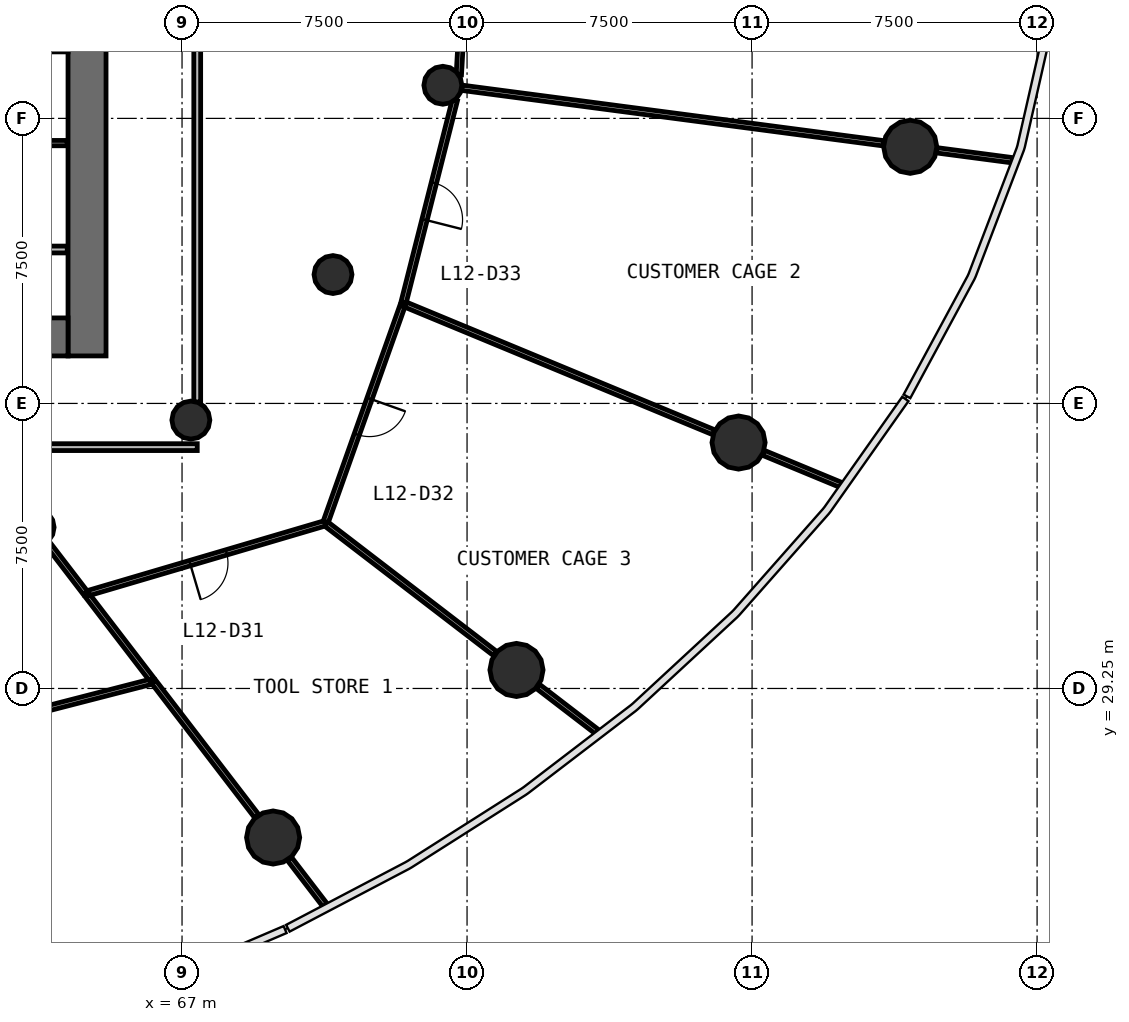
"""IFC4 building model, lengths in metres.
Left out: names, types, materials, properties, quantities, classifications, styles, units other than length and angle.
Written with IfcOpenShell. Run it as: python <this file> out.ifc"""

import sys

from ifc_helpers import new_model, si_unit, direction, frame, frame_2d, origin, origin_2d, place, context, subcontext, project, spatial, rectangle, circle, extrude, source, transform, mapped, element, fill, save


model = new_model("IFC4")
c1 = context("Model", 3, precision=1e-05, world=origin(), true_north=direction((0.0, 1.0)))
c2 = subcontext(c1, "Body", "Model", "MODEL_VIEW")
j1 = project(units=[si_unit("LENGTHUNIT", "METRE"), si_unit("PLANEANGLEUNIT", "RADIAN")], contexts=[c1])
p1 = place(None, origin())
s1 = spatial("IfcSite", under=j1, at=p1, CompositionType="ELEMENT")
p2 = place(p1, origin())
s2 = spatial("IfcBuilding", under=s1, at=p2, CompositionType="ELEMENT")
p3 = place(p2, frame((0.0, 0.0, 53.4)))
s3 = spatial("IfcBuildingStorey", under=s2, at=p3, CompositionType="ELEMENT", Elevation=53.4)
p4 = place(p3, frame((64.5, 38.0, 0.0), z_axis=(0.0, 0.0, 1.0), x_axis=(0.0, 1.0, 0.0)))
e1 = element("IfcWall", 1, at=p4, inside=s3, PredefinedType="SHEAR", context=c2, shape_type="SweptSolid", body=[
    extrude(rectangle(XDim=20.0, YDim=1.0, at=frame_2d((10.0, 0.0))), origin(), (0.0, 0.0, 1.0), 4.4),
])
p5 = place(p4, frame((9.1, 0.0, 0.0)))
e2 = element("IfcOpeningElement", 2, at=p5, cuts=e1, PredefinedType="OPENING", context=c2, shape_type="SweptSolid", body=[
    extrude(rectangle(XDim=1.8, YDim=2.1, at=frame_2d((0.9, 1.05))), frame((0.0, 0.51, 0.0), z_axis=(0.0, -1.0, 0.0), x_axis=(1.0, 0.0, 0.0)), (0.0, 0.0, 1.0), 1.02),
])
p6 = place(p3, frame((40.0, 38.5, 0.0), z_axis=(0.0, 0.0, 1.0), x_axis=(1.0, 0.0, 0.0)))
e3 = element("IfcWall", 3, at=p6, inside=s3, PredefinedType="SHEAR", context=c2, shape_type="SweptSolid", body=[
    extrude(rectangle(XDim=24.0, YDim=1.0, at=frame_2d((12.0, 0.0))), origin(), (0.0, 0.0, 1.0), 4.4),
])
p7 = place(p6, frame((21.45, 0.0, 0.0)))
e4 = element("IfcOpeningElement", 4, at=p7, cuts=e3, PredefinedType="OPENING", context=c2, shape_type="SweptSolid", body=[
    extrude(rectangle(XDim=1.1, YDim=2.1, at=frame_2d((0.55, 1.05))), frame((0.0, 0.51, 0.0), z_axis=(0.0, -1.0, 0.0), x_axis=(1.0, 0.0, 0.0)), (0.0, 0.0, 1.0), 1.02),
])
p8 = place(p6, frame((1.95, 0.0, 0.0)))
e5 = element("IfcOpeningElement", 5, at=p8, cuts=e3, PredefinedType="OPENING", context=c2, shape_type="SweptSolid", body=[
    extrude(rectangle(XDim=1.1, YDim=2.1, at=frame_2d((0.55, 1.05))), frame((0.0, 0.51, 0.0), z_axis=(0.0, -1.0, 0.0), x_axis=(1.0, 0.0, 0.0)), (0.0, 0.0, 1.0), 1.02),
])
m1 = source(origin(), c2, "Body", "SweptSolid", [
    extrude(circle(Radius=0.7, at=origin_2d()), origin(), (0.0, 0.0, 1.0), 4.4),
])
for number, where, z_axis, x_axis in (
    (6, (69.396, 25.328, 0.0), (0.0, 0.0, 1.0), (1.0, 0.0, 0.0)),
    (7, (75.801, 29.737, 0.0), (0.0, 0.0, 1.0), (1.0, 0.0, 0.0)),
    (8, (81.645, 35.721, 0.0), (0.0, 0.0, 1.0), (1.0, 0.0, 0.0)),
    (9, (86.161, 43.503, 0.0), (0.0, 0.0, 1.0), (1.0, 0.0, 0.0)),
):
    element("IfcColumn", number, at=place(p3, frame(where, z_axis=z_axis, x_axis=x_axis)), inside=s3, PredefinedType="COLUMN", context=c2, shape_type="MappedRepresentation", body=[
        mapped(m1, transform((0.0, 0.0, 0.0), scale=1.0)),
    ])
m2 = source(origin(), c2, "Body", "SweptSolid", [
    extrude(circle(Radius=0.5, at=origin_2d()), origin(), (0.0, 0.0, 1.0), 4.4),
])
for number, where, z_axis, x_axis in (
    (10, (63.134, 33.49, 0.0), (0.0, 0.0, 1.0), (1.0, 0.0, 0.0)),
    (11, (67.232, 36.312, 0.0), (0.0, 0.0, 1.0), (1.0, 0.0, 0.0)),
    (12, (70.972, 40.141, 0.0), (0.0, 0.0, 1.0), (1.0, 0.0, 0.0)),
    (13, (73.863, 45.122, 0.0), (0.0, 0.0, 1.0), (1.0, 0.0, 0.0)),
):
    element("IfcColumn", number, at=place(p3, frame(where, z_axis=z_axis, x_axis=x_axis)), inside=s3, PredefinedType="COLUMN", context=c2, shape_type="MappedRepresentation", body=[
        mapped(m2, transform((0.0, 0.0, 0.0), scale=1.0)),
    ])
p9 = place(p3, frame((67.4, 35.6, 0.0), z_axis=(0.0, 0.0, 1.0), x_axis=(-1.0, 0.0, 0.0)))
e14 = element("IfcWall", 14, at=p9, inside=s3, PredefinedType="PARTITIONING", context=c2, shape_type="SweptSolid", body=[
    extrude(rectangle(XDim=30.8, YDim=0.18, at=frame_2d((15.4, 0.0))), origin(), (0.0, 0.0, 1.0), 3.05),
])
p10 = place(p9, frame((27.45, 0.0, 0.0)))
e15 = element("IfcOpeningElement", 15, at=p10, cuts=e14, PredefinedType="OPENING", context=c2, shape_type="SweptSolid", body=[
    extrude(rectangle(XDim=0.9, YDim=2.1, at=frame_2d((0.45, 1.05))), frame((0.0, 0.1, 0.0), z_axis=(0.0, -1.0, 0.0), x_axis=(1.0, 0.0, 0.0)), (0.0, 0.0, 1.0), 0.2),
])
p11 = place(p9, frame((23.85, 0.0, 0.0)))
e16 = element("IfcOpeningElement", 16, at=p11, cuts=e14, PredefinedType="OPENING", context=c2, shape_type="SweptSolid", body=[
    extrude(rectangle(XDim=0.9, YDim=2.1, at=frame_2d((0.45, 1.05))), frame((0.0, 0.1, 0.0), z_axis=(0.0, -1.0, 0.0), x_axis=(1.0, 0.0, 0.0)), (0.0, 0.0, 1.0), 0.2),
])
p12 = place(p9, frame((20.85, 0.0, 0.0)))
e17 = element("IfcOpeningElement", 17, at=p12, cuts=e14, PredefinedType="OPENING", context=c2, shape_type="SweptSolid", body=[
    extrude(rectangle(XDim=0.9, YDim=2.1, at=frame_2d((0.45, 1.05))), frame((0.0, 0.1, 0.0), z_axis=(0.0, -1.0, 0.0), x_axis=(1.0, 0.0, 0.0)), (0.0, 0.0, 1.0), 0.2),
])
p13 = place(p9, frame((14.95, 0.0, 0.0)))
e18 = element("IfcOpeningElement", 18, at=p13, cuts=e14, PredefinedType="OPENING", context=c2, shape_type="SweptSolid", body=[
    extrude(rectangle(XDim=1.0, YDim=2.1, at=frame_2d((0.5, 1.05))), frame((0.0, 0.1, 0.0), z_axis=(0.0, -1.0, 0.0), x_axis=(1.0, 0.0, 0.0)), (0.0, 0.0, 1.0), 0.2),
])
p14 = place(p3, frame((67.4, 60.37, 0.0), z_axis=(0.0, 0.0, 1.0), x_axis=(0.0, -1.0, 0.0)))
e19 = element("IfcWall", 19, at=p14, inside=s3, PredefinedType="PARTITIONING", context=c2, shape_type="SweptSolid", body=[
    extrude(rectangle(XDim=23.583, YDim=0.18, at=frame_2d((11.791, 0.0))), origin(), (0.0, 0.0, 1.0), 3.05),
])
p15 = place(p14, frame((11.333, 0.0, 0.0)))
e20 = element("IfcOpeningElement", 20, at=p15, cuts=e19, PredefinedType="OPENING", context=c2, shape_type="SweptSolid", body=[
    extrude(rectangle(XDim=1.0, YDim=2.1, at=frame_2d((0.5, 1.05))), frame((0.0, 0.1, 0.0), z_axis=(0.0, -1.0, 0.0), x_axis=(1.0, 0.0, 0.0)), (0.0, 0.0, 1.0), 0.2),
])
p16 = place(p14, frame((9.133, 0.0, 0.0)))
e21 = element("IfcOpeningElement", 21, at=p16, cuts=e19, PredefinedType="OPENING", context=c2, shape_type="SweptSolid", body=[
    extrude(rectangle(XDim=1.0, YDim=2.1, at=frame_2d((0.5, 1.05))), frame((0.0, 0.1, 0.0), z_axis=(0.0, -1.0, 0.0), x_axis=(1.0, 0.0, 0.0)), (0.0, 0.0, 1.0), 0.2),
])
p17 = place(p3, frame((60.23, 40.8, 0.0), z_axis=(0.0, 0.0, 1.0), x_axis=(1.0, 0.0, 0.0)))
e22 = element("IfcWall", 22, at=p17, inside=s3, PredefinedType="PARTITIONING", context=c2, shape_type="SweptSolid", body=[
    extrude(rectangle(XDim=3.75, YDim=0.18, at=frame_2d((1.875, 0.0))), origin(), (0.0, 0.0, 1.0), 3.95),
])
p18 = place(p17, frame((1.4, 0.0, 0.0)))
e23 = element("IfcOpeningElement", 23, at=p18, cuts=e22, PredefinedType="OPENING", context=c2, shape_type="SweptSolid", body=[
    extrude(rectangle(XDim=0.9, YDim=2.1, at=frame_2d((0.45, 1.05))), frame((0.0, 0.1, 0.0), z_axis=(0.0, -1.0, 0.0), x_axis=(1.0, 0.0, 0.0)), (0.0, 0.0, 1.0), 0.2),
])
p19 = place(p3, frame((74.363, 45.056, 0.0), z_axis=(0.0, 0.0, 1.0), x_axis=(0.991443306772, -0.130538000051, 0.0)))
e24 = element("IfcWall", 24, at=p19, inside=s3, PredefinedType="PARTITIONING", context=c2, shape_type="SweptSolid", body=[
    extrude(rectangle(XDim=11.195, YDim=0.14, at=frame_2d((5.598, 0.0))), origin(), (0.0, 0.0, 1.0), 3.05),
])
p20 = place(p3, frame((72.821, 39.375, 0.0), z_axis=(0.0, 0.0, 1.0), x_axis=(0.923875203153, -0.382693884193, 0.0)))
e25 = element("IfcWall", 25, at=p20, inside=s3, PredefinedType="PARTITIONING", context=c2, shape_type="SweptSolid", body=[
    extrude(rectangle(XDim=8.845, YDim=0.14, at=frame_2d((4.423, 0.0))), origin(), (0.0, 0.0, 1.0), 3.05),
])
p21 = place(p3, frame((70.769, 33.598, 0.0), z_axis=(0.0, 0.0, 1.0), x_axis=(-0.959164410747, -0.282849134974, 0.0)))
e26 = element("IfcWall", 26, at=p21, inside=s3, PredefinedType="PARTITIONING", context=c2, shape_type="SweptSolid", body=[
    extrude(rectangle(XDim=6.562, YDim=0.14, at=frame_2d((3.281, 0.0))), origin(), (0.0, 0.0, 1.0), 3.05),
])
p22 = place(p21, frame((2.712, 0.0, 0.0)))
e27 = element("IfcOpeningElement", 27, at=p22, cuts=e26, PredefinedType="OPENING", context=c2, shape_type="SweptSolid", body=[
    extrude(rectangle(XDim=1.0, YDim=2.1, at=frame_2d((0.5, 1.05))), frame((0.0, 0.08, 0.0), z_axis=(0.0, -1.0, 0.0), x_axis=(1.0, 0.0, 0.0)), (0.0, 0.0, 1.0), 0.16),
])
p23 = place(p3, frame((72.798, 39.309, 0.0), z_axis=(0.0, 0.0, 1.0), x_axis=(-0.334820387554, -0.942281968456, 0.0)))
e28 = element("IfcWall", 28, at=p23, inside=s3, PredefinedType="PARTITIONING", context=c2, shape_type="SweptSolid", body=[
    extrude(rectangle(XDim=6.031, YDim=0.14, at=frame_2d((3.016, 0.0))), origin(), (0.0, 0.0, 1.0), 3.05),
])
p24 = place(p23, frame((2.581, 0.0, 0.0)))
e29 = element("IfcOpeningElement", 29, at=p24, cuts=e28, PredefinedType="OPENING", context=c2, shape_type="SweptSolid", body=[
    extrude(rectangle(XDim=1.0, YDim=2.1, at=frame_2d((0.5, 1.05))), frame((0.0, 0.08, 0.0), z_axis=(0.0, -1.0, 0.0), x_axis=(1.0, 0.0, 0.0)), (0.0, 0.0, 1.0), 0.16),
])
p25 = place(p3, frame((60.319, 27.916, 0.0), z_axis=(0.0, 0.0, 1.0), x_axis=(0.968340865999, 0.24963166313, 0.0)))
e30 = element("IfcWall", 30, at=p25, inside=s3, PredefinedType="PARTITIONING", context=c2, shape_type="SweptSolid", body=[
    extrude(rectangle(XDim=6.115, YDim=0.14, at=frame_2d((3.057, 0.0))), origin(), (0.0, 0.0, 1.0), 3.05),
])
p26 = place(p3, frame((70.793, 33.58, 0.0), z_axis=(0.0, 0.0, 1.0), x_axis=(0.793369467151, -0.6087404115, 0.0)))
e31 = element("IfcWall", 31, at=p26, inside=s3, PredefinedType="PARTITIONING", context=c2, shape_type="SweptSolid", body=[
    extrude(rectangle(XDim=5.608, YDim=0.14, at=frame_2d((2.804, 0.0))), origin(), (0.0, 0.0, 1.0), 3.05),
])
p27 = place(p3, frame((74.178, 44.727, 0.0), z_axis=(0.0, 0.0, 1.0), x_axis=(-0.245735490717, -0.969336922129, 0.0)))
e32 = element("IfcWall", 32, at=p27, inside=s3, PredefinedType="PARTITIONING", context=c2, shape_type="SweptSolid", body=[
    extrude(rectangle(XDim=5.491, YDim=0.14, at=frame_2d((2.746, 0.0))), origin(), (0.0, 0.0, 1.0), 3.05),
])
p28 = place(p27, frame((2.241, 0.0, 0.0)))
e33 = element("IfcOpeningElement", 33, at=p28, cuts=e32, PredefinedType="OPENING", context=c2, shape_type="SweptSolid", body=[
    extrude(rectangle(XDim=1.0, YDim=2.1, at=frame_2d((0.5, 1.05))), frame((0.0, 0.08, 0.0), z_axis=(0.0, -1.0, 0.0), x_axis=(1.0, 0.0, 0.0)), (0.0, 0.0, 1.0), 0.16),
])
p29 = place(p3, frame((74.589, 50.793, 0.0), z_axis=(0.0, 0.0, 1.0), x_axis=(-0.056551571082, -0.998399679391, 0.0)))
e34 = element("IfcWall", 34, at=p29, inside=s3, PredefinedType="PARTITIONING", context=c2, shape_type="SweptSolid", body=[
    extrude(rectangle(XDim=5.401, YDim=0.14, at=frame_2d((2.7, 0.0))), origin(), (0.0, 0.0, 1.0), 3.05),
])
p30 = place(p29, frame((2.151, 0.0, 0.0)))
e35 = element("IfcOpeningElement", 35, at=p30, cuts=e34, PredefinedType="OPENING", context=c2, shape_type="SweptSolid", body=[
    extrude(rectangle(XDim=1.0, YDim=2.1, at=frame_2d((0.5, 1.05))), frame((0.0, 0.08, 0.0), z_axis=(0.0, -1.0, 0.0), x_axis=(1.0, 0.0, 0.0)), (0.0, 0.0, 1.0), 0.16),
])
p31 = place(p3, frame((66.258, 29.418, 0.0), z_axis=(0.0, 0.0, 1.0), x_axis=(0.608774632027, -0.793343209085, 0.0)))
e36 = element("IfcWall", 36, at=p31, inside=s3, PredefinedType="PARTITIONING", context=c2, shape_type="SweptSolid", body=[
    extrude(rectangle(XDim=4.451, YDim=0.14, at=frame_2d((2.226, 0.0))), origin(), (0.0, 0.0, 1.0), 3.05),
])
p32 = place(p3, frame((60.23, 43.6, 0.0), z_axis=(0.0, 0.0, 1.0), x_axis=(1.0, 0.0, 0.0)))
e37 = element("IfcWall", 37, at=p32, inside=s3, PredefinedType="PARTITIONING", context=c2, shape_type="SweptSolid", body=[
    extrude(rectangle(XDim=3.75, YDim=0.14, at=frame_2d((1.875, 0.0))), origin(), (0.0, 0.0, 1.0), 3.05),
])
p33 = place(p3, frame((64.521, 31.683, 0.0), z_axis=(0.0, 0.0, 1.0), x_axis=(0.608761578312, -0.793353225727, 0.0)))
e38 = element("IfcWall", 38, at=p33, inside=s3, PredefinedType="PARTITIONING", context=c2, shape_type="SweptSolid", body=[
    extrude(rectangle(XDim=2.748, YDim=0.14, at=frame_2d((1.374, 0.0))), origin(), (0.0, 0.0, 1.0), 3.05),
])
p34 = place(p3, frame((82.296, 35.451, 0.0), z_axis=(0.0, 0.0, 1.0), x_axis=(0.923899948789, -0.382634139392, 0.0)))
e39 = element("IfcWall", 39, at=p34, inside=s3, PredefinedType="PARTITIONING", context=c2, shape_type="SweptSolid", body=[
    extrude(rectangle(XDim=2.215, YDim=0.14, at=frame_2d((1.107, 0.0))), origin(), (0.0, 0.0, 1.0), 3.05),
])
p35 = place(p3, frame((86.859, 43.411, 0.0), z_axis=(0.0, 0.0, 1.0), x_axis=(0.991443960057, -0.130533038219, 0.0)))
e40 = element("IfcWall", 40, at=p35, inside=s3, PredefinedType="PARTITIONING", context=c2, shape_type="SweptSolid", body=[
    extrude(rectangle(XDim=2.01, YDim=0.14, at=frame_2d((1.005, 0.0))), origin(), (0.0, 0.0, 1.0), 3.05),
])
p36 = place(p3, frame((76.359, 29.309, 0.0), z_axis=(0.0, 0.0, 1.0), x_axis=(0.793312100237, -0.608815170325, 0.0)))
e41 = element("IfcWall", 41, at=p36, inside=s3, PredefinedType="PARTITIONING", context=c2, shape_type="SweptSolid", body=[
    extrude(rectangle(XDim=1.977, YDim=0.14, at=frame_2d((0.989, 0.0))), origin(), (0.0, 0.0, 1.0), 3.05),
])
p37 = place(p3, frame((63.441, 33.09, 0.0), z_axis=(0.0, 0.0, 1.0), x_axis=(0.608812360851, -0.793314256317, 0.0)))
e42 = element("IfcWall", 42, at=p37, inside=s3, PredefinedType="PARTITIONING", context=c2, shape_type="SweptSolid", body=[
    extrude(rectangle(XDim=1.669, YDim=0.14, at=frame_2d((0.834, 0.0))), origin(), (0.0, 0.0, 1.0), 3.05),
])
p38 = place(p3, frame((69.825, 24.77, 0.0), z_axis=(0.0, 0.0, 1.0), x_axis=(0.608816471317, -0.793311101809, 0.0)))
e43 = element("IfcWall", 43, at=p38, inside=s3, PredefinedType="PARTITIONING", context=c2, shape_type="SweptSolid", body=[
    extrude(rectangle(XDim=1.544, YDim=0.14, at=frame_2d((0.772, 0.0))), origin(), (0.0, 0.0, 1.0), 3.05),
])
m3 = source(origin(), c2, "Body", "SweptSolid", [
    extrude(rectangle(XDim=1.0, YDim=2.1, at=frame_2d((0.5, 1.05))), frame((0.0, 0.025, 0.0), z_axis=(0.0, -1.0, 0.0), x_axis=(1.0, 0.0, 0.0)), (0.0, 0.0, 1.0), 0.05),
])
p39 = place(p22, origin())
e44 = element("IfcDoor", 44, at=p39, inside=s3, OperationType="SINGLE_SWING_RIGHT", PredefinedType="DOOR", context=c2, shape_type="MappedRepresentation", body=[
    mapped(m3, transform((0.0, 0.0, 0.0), scale=1.0)),
])
fill(e27, e44)
p40 = place(p24, origin())
e45 = element("IfcDoor", 45, at=p40, inside=s3, OperationType="SINGLE_SWING_LEFT", PredefinedType="DOOR", context=c2, shape_type="MappedRepresentation", body=[
    mapped(m3, transform((0.0, 0.0, 0.0), scale=1.0)),
])
fill(e29, e45)
p41 = place(p28, origin())
e46 = element("IfcDoor", 46, at=p41, inside=s3, OperationType="SINGLE_SWING_RIGHT", PredefinedType="DOOR", context=c2, shape_type="MappedRepresentation", body=[
    mapped(m3, transform((0.0, 0.0, 0.0), scale=1.0)),
])
fill(e33, e46)
save(model, sys.argv[1])
